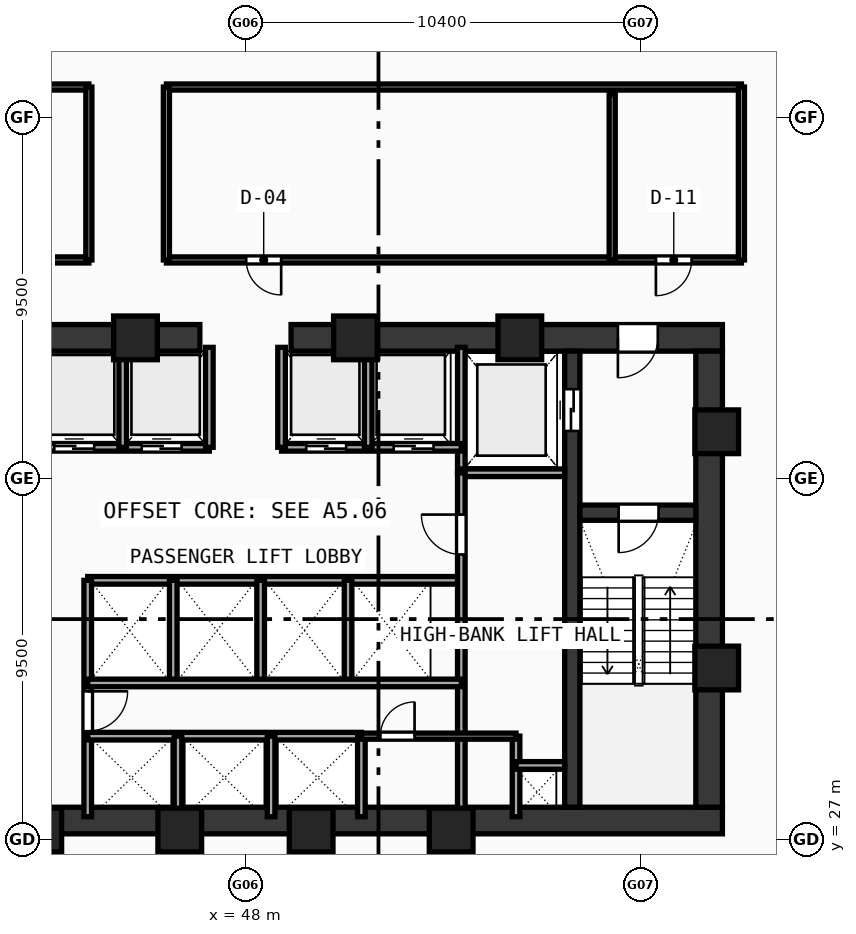
"""IFC4 building model, lengths in metres.
Left out: names, types, materials, properties, quantities, classifications, styles, units other than length and angle.
Written with IfcOpenShell. Run it as: python <this file> out.ifc"""

import sys

from ifc_helpers import new_model, si_unit, direction, frame, frame_2d, origin, origin_with_axes, origin_2d, place, context, subcontext, project, spatial, rectangle, hollow_rectangle, extrude, source, transform, mapped, element, fill, save


model = new_model("IFC4")
c1 = context("Model", 3, precision=1e-05, world=origin(), true_north=direction((0.0, 1.0)))
c2 = subcontext(c1, "Body", "Model", "MODEL_VIEW")
j1 = project(units=[si_unit("LENGTHUNIT", "METRE"), si_unit("PLANEANGLEUNIT", "RADIAN")], contexts=[c1])
p1 = place(None, origin())
s1 = spatial("IfcSite", under=j1, at=p1, CompositionType="ELEMENT")
p2 = place(p1, origin())
s2 = spatial("IfcBuilding", under=s1, at=p2, CompositionType="ELEMENT")
p3 = place(p2, frame((0.0, 0.0, 52.18)))
s3 = spatial("IfcBuildingStorey", under=s2, at=p3, CompositionType="ELEMENT", Elevation=52.18)
p4 = place(p3, frame((35.45, 27.5, 0.0), z_axis=(0.0, 0.0, 1.0), x_axis=(1.0, 0.0, 0.0)))
e1 = element("IfcWall", 1, at=p4, inside=s3, PredefinedType="SHEAR", context=c2, shape_type="SweptSolid", body=[
    extrude(rectangle(XDim=25.1, YDim=0.7, at=frame_2d((12.55, 0.0))), origin(), (0.0, 0.0, 1.0), 3.37),
])
p5 = place(p3, frame((35.45, 40.2, 0.0), z_axis=(0.0, 0.0, 1.0), x_axis=(1.0, 0.0, 0.0)))
e2 = element("IfcWall", 2, at=p5, inside=s3, PredefinedType="SHEAR", context=c2, shape_type="SweptSolid", body=[
    extrude(rectangle(XDim=11.35, YDim=0.7, at=frame_2d((5.675, 0.0))), origin(), (0.0, 0.0, 1.0), 3.37),
])
p6 = place(p5, frame((1.7, 0.0, 0.0)))
e3 = element("IfcOpeningElement", 3, at=p6, cuts=e2, PredefinedType="OPENING", context=c2, shape_type="SweptSolid", body=[
    extrude(rectangle(XDim=1.05, YDim=2.1, at=frame_2d((0.525, 1.05))), frame((0.0, 0.36, 0.0), z_axis=(0.0, -1.0, 0.0), x_axis=(1.0, 0.0, 0.0)), (0.0, 0.0, 1.0), 0.72),
])
p7 = place(p3, frame((49.2, 40.2, 0.0), z_axis=(0.0, 0.0, 1.0), x_axis=(1.0, 0.0, 0.0)))
e4 = element("IfcWall", 4, at=p7, inside=s3, PredefinedType="SHEAR", context=c2, shape_type="SweptSolid", body=[
    extrude(rectangle(XDim=11.35, YDim=0.7, at=frame_2d((5.675, 0.0))), origin(), (0.0, 0.0, 1.0), 3.37),
])
p8 = place(p7, frame((8.6, 0.0, 0.0)))
e5 = element("IfcOpeningElement", 5, at=p8, cuts=e4, PredefinedType="OPENING", context=c2, shape_type="SweptSolid", body=[
    extrude(rectangle(XDim=1.05, YDim=2.1, at=frame_2d((0.525, 1.05))), frame((0.0, 0.36, 0.0), z_axis=(0.0, -1.0, 0.0), x_axis=(1.0, 0.0, 0.0)), (0.0, 0.0, 1.0), 0.72),
])
p9 = place(p3, frame((60.2, 27.85, 0.0), z_axis=(0.0, 0.0, 1.0), x_axis=(0.0, 1.0, 0.0)))
e6 = element("IfcWall", 6, at=p9, inside=s3, PredefinedType="SHEAR", context=c2, shape_type="SweptSolid", body=[
    extrude(rectangle(XDim=12.0, YDim=0.7, at=frame_2d((6.0, 0.0))), origin(), (0.0, 0.0, 1.0), 3.37),
])
p10 = place(p3, frame((56.6, 27.85, 0.0), z_axis=(0.0, 0.0, 1.0), x_axis=(0.0, 1.0, 0.0)))
e7 = element("IfcWall", 7, at=p10, inside=s3, PredefinedType="SHEAR", context=c2, shape_type="SweptSolid", body=[
    extrude(rectangle(XDim=12.0, YDim=0.4, at=frame_2d((6.0, 0.0))), origin(), (0.0, 0.0, 1.0), 3.37),
])
p11 = place(p10, frame((9.9, 0.0, 0.0)))
e8 = element("IfcOpeningElement", 8, at=p11, cuts=e7, PredefinedType="OPENING", context=c2, shape_type="SweptSolid", body=[
    extrude(rectangle(XDim=1.1, YDim=2.1, at=frame_2d((0.55, 1.05))), frame((0.0, 0.21, 0.0), z_axis=(0.0, -1.0, 0.0), x_axis=(1.0, 0.0, 0.0)), (0.0, 0.0, 1.0), 0.42),
])
p12 = place(p3, frame((56.8, 35.6, 0.0), z_axis=(0.0, 0.0, 1.0), x_axis=(1.0, 0.0, 0.0)))
e9 = element("IfcWall", 9, at=p12, inside=s3, PredefinedType="SHEAR", context=c2, shape_type="SweptSolid", body=[
    extrude(rectangle(XDim=3.05, YDim=0.4, at=frame_2d((1.525, 0.0))), origin(), (0.0, 0.0, 1.0), 3.37),
])
p13 = place(p12, frame((1.02, 0.0, 0.0)))
e10 = element("IfcOpeningElement", 10, at=p13, cuts=e9, PredefinedType="OPENING", context=c2, shape_type="SweptSolid", body=[
    extrude(rectangle(XDim=1.05, YDim=2.1, at=frame_2d((0.525, 1.05))), frame((0.0, 0.21, 0.0), z_axis=(0.0, -1.0, 0.0), x_axis=(1.0, 0.0, 0.0)), (0.0, 0.0, 1.0), 0.42),
])
m1 = source(origin(), c2, "Body", "SweptSolid", [
    extrude(hollow_rectangle(XDim=1.15, YDim=1.15, WallThickness=0.048, at=origin_2d()), origin(), (0.0, 0.0, 1.0), 3.63),
])
for number, where, z_axis, x_axis in (
    (11, (42.588, 27.25, -0.26), (0.0, 0.0, 1.0), (1.0, 0.0, 0.0)),
    (12, (46.272, 27.25, -0.26), (0.0, 0.0, 1.0), (1.0, 0.0, 0.0)),
    (13, (49.729, 27.25, -0.26), (0.0, 0.0, 1.0), (1.0, 0.0, 0.0)),
    (14, (53.412, 27.25, -0.26), (0.0, 0.0, 1.0), (1.0, 0.0, 0.0)),
    (15, (60.4, 31.513, -0.26), (0.0, 0.0, 1.0), (1.0, 0.0, 0.0)),
    (16, (60.4, 37.729, -0.26), (0.0, 0.0, 1.0), (1.0, 0.0, 0.0)),
    (17, (55.219, 40.2, -0.26), (0.0, 0.0, 1.0), (1.0, 0.0, 0.0)),
    (18, (50.894, 40.2, -0.26), (0.0, 0.0, 1.0), (1.0, 0.0, 0.0)),
    (19, (45.106, 40.2, -0.26), (0.0, 0.0, 1.0), (1.0, 0.0, 0.0)),
):
    element("IfcColumn", number, at=place(p3, frame(where, z_axis=z_axis, x_axis=x_axis)), inside=s3, PredefinedType="COLUMN", context=c2, shape_type="MappedRepresentation", body=[
        mapped(m1, transform((0.0, 0.0, 0.0), scale=1.0)),
    ])
p14 = place(p3, frame((53.68, 36.65, 0.0), z_axis=(0.0, 0.0, 1.0), x_axis=(0.0, 1.0, 0.0)))
e20 = element("IfcWall", 20, at=p14, inside=s3, PredefinedType="SOLIDWALL", context=c2, shape_type="SweptSolid", body=[
    extrude(rectangle(XDim=3.3, YDim=0.2, at=frame_2d((1.65, 0.0))), origin(), (0.0, 0.0, 1.0), 3.37),
])
p15 = place(p3, frame((53.68, 36.65, 0.0), z_axis=(0.0, 0.0, 1.0), x_axis=(1.0, 0.0, 0.0)))
e21 = element("IfcWall", 21, at=p15, inside=s3, PredefinedType="SOLIDWALL", context=c2, shape_type="SweptSolid", body=[
    extrude(rectangle(XDim=2.72, YDim=0.2, at=frame_2d((1.36, 0.0))), origin(), (0.0, 0.0, 1.0), 3.37),
])
p16 = place(p3, frame((42.32, 37.32, 0.0), z_axis=(0.0, 0.0, 1.0), x_axis=(1.0, 0.0, 0.0)))
e22 = element("IfcWall", 22, at=p16, inside=s3, PredefinedType="SOLIDWALL", context=c2, shape_type="SweptSolid", body=[
    extrude(rectangle(XDim=4.73, YDim=0.2, at=frame_2d((2.365, 0.0))), origin(), (0.0, 0.0, 1.0), 3.37),
])
p17 = place(p16, frame((0.65, 0.0, 0.0)))
e23 = element("IfcOpeningElement", 23, at=p17, cuts=e22, PredefinedType="OPENING", context=c2, shape_type="SweptSolid", body=[
    extrude(rectangle(XDim=1.05, YDim=2.1, at=frame_2d((0.525, 1.05))), frame((0.0, 0.11, 0.0), z_axis=(0.0, -1.0, 0.0), x_axis=(1.0, 0.0, 0.0)), (0.0, 0.0, 1.0), 0.22),
])
p18 = place(p16, frame((2.95, 0.0, 0.0)))
e24 = element("IfcOpeningElement", 24, at=p18, cuts=e22, PredefinedType="OPENING", context=c2, shape_type="SweptSolid", body=[
    extrude(rectangle(XDim=1.05, YDim=2.1, at=frame_2d((0.525, 1.05))), frame((0.0, 0.11, 0.0), z_axis=(0.0, -1.0, 0.0), x_axis=(1.0, 0.0, 0.0)), (0.0, 0.0, 1.0), 0.22),
])
p19 = place(p3, frame((48.95, 37.32, 0.0), z_axis=(0.0, 0.0, 1.0), x_axis=(1.0, 0.0, 0.0)))
e25 = element("IfcWall", 25, at=p19, inside=s3, PredefinedType="SOLIDWALL", context=c2, shape_type="SweptSolid", body=[
    extrude(rectangle(XDim=4.73, YDim=0.2, at=frame_2d((2.365, 0.0))), origin(), (0.0, 0.0, 1.0), 3.37),
])
p20 = place(p19, frame((0.65, 0.0, 0.0)))
e26 = element("IfcOpeningElement", 26, at=p20, cuts=e25, PredefinedType="OPENING", context=c2, shape_type="SweptSolid", body=[
    extrude(rectangle(XDim=1.05, YDim=2.1, at=frame_2d((0.525, 1.05))), frame((0.0, 0.11, 0.0), z_axis=(0.0, -1.0, 0.0), x_axis=(1.0, 0.0, 0.0)), (0.0, 0.0, 1.0), 0.22),
])
p21 = place(p19, frame((2.95, 0.0, 0.0)))
e27 = element("IfcOpeningElement", 27, at=p21, cuts=e25, PredefinedType="OPENING", context=c2, shape_type="SweptSolid", body=[
    extrude(rectangle(XDim=1.05, YDim=2.1, at=frame_2d((0.525, 1.05))), frame((0.0, 0.11, 0.0), z_axis=(0.0, -1.0, 0.0), x_axis=(1.0, 0.0, 0.0)), (0.0, 0.0, 1.0), 0.22),
])
for number, where, z_axis, x_axis in (
    (28, (47.05, 37.32, 0.0), (0.0, 0.0, 1.0), (0.0, 1.0, 0.0)),
    (29, (48.95, 37.32, 0.0), (0.0, 0.0, 1.0), (0.0, 1.0, 0.0)),
    (30, (44.77, 37.32, 0.0), (0.0, 0.0, 1.0), (0.0, 1.0, 0.0)),
    (31, (51.23, 37.32, 0.0), (0.0, 0.0, 1.0), (0.0, 1.0, 0.0)),
):
    element("IfcWall", number, at=place(p3, frame(where, z_axis=z_axis, x_axis=x_axis)), inside=s3, PredefinedType="SOLIDWALL", context=c2, shape_type="SweptSolid", body=[
        extrude(rectangle(XDim=2.63, YDim=0.2, at=frame_2d((1.315, 0.0))), origin(), (0.0, 0.0, 1.0), 3.37),
    ])
p22 = place(p3, frame((43.85, 33.82, 0.0), z_axis=(0.0, 0.0, 1.0), x_axis=(1.0, 0.0, 0.0)))
e32 = element("IfcWall", 32, at=p22, inside=s3, PredefinedType="SOLIDWALL", context=c2, shape_type="SweptSolid", body=[
    extrude(rectangle(XDim=9.83, YDim=0.2, at=frame_2d((4.915, 0.0))), origin(), (0.0, 0.0, 1.0), 3.37),
])
p23 = place(p3, frame((43.85, 27.6, 0.0), z_axis=(0.0, 0.0, 1.0), x_axis=(0.0, 1.0, 0.0)))
e33 = element("IfcWall", 33, at=p23, inside=s3, PredefinedType="SOLIDWALL", context=c2, shape_type="SweptSolid", body=[
    extrude(rectangle(XDim=6.22, YDim=0.2, at=frame_2d((3.11, 0.0))), origin(), (0.0, 0.0, 1.0), 3.37),
])
p24 = place(p23, frame((2.25, 0.0, 0.0)))
e34 = element("IfcOpeningElement", 34, at=p24, cuts=e33, PredefinedType="OPENING", context=c2, shape_type="SweptSolid", body=[
    extrude(rectangle(XDim=1.05, YDim=2.1, at=frame_2d((0.525, 1.05))), frame((0.0, 0.11, 0.0), z_axis=(0.0, -1.0, 0.0), x_axis=(1.0, 0.0, 0.0)), (0.0, 0.0, 1.0), 0.22),
])
p25 = place(p3, frame((53.68, 27.6, 0.0), z_axis=(0.0, 0.0, 1.0), x_axis=(0.0, 1.0, 0.0)))
e35 = element("IfcWall", 35, at=p25, inside=s3, PredefinedType="SOLIDWALL", context=c2, shape_type="SweptSolid", body=[
    extrude(rectangle(XDim=9.05, YDim=0.2, at=frame_2d((4.525, 0.0))), origin(), (0.0, 0.0, 1.0), 3.37),
])
p26 = place(p25, frame((6.9, 0.0, 0.0)))
e36 = element("IfcOpeningElement", 36, at=p26, cuts=e35, PredefinedType="OPENING", context=c2, shape_type="SweptSolid", body=[
    extrude(rectangle(XDim=1.05, YDim=2.1, at=frame_2d((0.525, 1.05))), frame((0.0, 0.11, 0.0), z_axis=(0.0, -1.0, 0.0), x_axis=(1.0, 0.0, 0.0)), (0.0, 0.0, 1.0), 0.22),
])
for number, where, z_axis, x_axis in (
    (37, (46.1, 31.12, 0.0), (0.0, 0.0, 1.0), (0.0, 1.0, 0.0)),
    (38, (48.4, 31.12, 0.0), (0.0, 0.0, 1.0), (0.0, 1.0, 0.0)),
    (39, (50.7, 31.12, 0.0), (0.0, 0.0, 1.0), (0.0, 1.0, 0.0)),
):
    element("IfcWall", number, at=place(p3, frame(where, z_axis=z_axis, x_axis=x_axis)), inside=s3, PredefinedType="SOLIDWALL", context=c2, shape_type="SweptSolid", body=[
        extrude(rectangle(XDim=2.7, YDim=0.2, at=frame_2d((1.35, 0.0))), origin(), (0.0, 0.0, 1.0), 3.37),
    ])
p27 = place(p3, frame((43.85, 29.72, 0.0), z_axis=(0.0, 0.0, 1.0), x_axis=(1.0, 0.0, 0.0)))
e40 = element("IfcWall", 40, at=p27, inside=s3, PredefinedType="SOLIDWALL", context=c2, shape_type="SweptSolid", body=[
    extrude(rectangle(XDim=7.2, YDim=0.2, at=frame_2d((3.6, 0.0))), origin(), (0.0, 0.0, 1.0), 3.37),
])
p28 = place(p3, frame((51.05, 27.6, 0.0), z_axis=(0.0, 0.0, 1.0), x_axis=(0.0, 1.0, 0.0)))
e41 = element("IfcWall", 41, at=p28, inside=s3, PredefinedType="SOLIDWALL", context=c2, shape_type="SweptSolid", body=[
    extrude(rectangle(XDim=2.12, YDim=0.2, at=frame_2d((1.06, 0.0))), origin(), (0.0, 0.0, 1.0), 3.37),
])
p29 = place(p3, frame((43.85, 31.12, 0.0), z_axis=(0.0, 0.0, 1.0), x_axis=(1.0, 0.0, 0.0)))
e42 = element("IfcWall", 42, at=p29, inside=s3, PredefinedType="SOLIDWALL", context=c2, shape_type="SweptSolid", body=[
    extrude(rectangle(XDim=9.83, YDim=0.2, at=frame_2d((4.915, 0.0))), origin(), (0.0, 0.0, 1.0), 3.37),
])
for number, where, z_axis, x_axis in (
    (43, (46.225, 27.6, 0.0), (0.0, 0.0, 1.0), (0.0, 1.0, 0.0)),
    (44, (48.675, 27.6, 0.0), (0.0, 0.0, 1.0), (0.0, 1.0, 0.0)),
    (45, (55.12, 27.6, 0.0), (0.0, 0.0, 1.0), (0.0, 1.0, 0.0)),
):
    element("IfcWall", number, at=place(p3, frame(where, z_axis=z_axis, x_axis=x_axis)), inside=s3, PredefinedType="SOLIDWALL", context=c2, shape_type="SweptSolid", body=[
        extrude(rectangle(XDim=2.12, YDim=0.2, at=frame_2d((1.06, 0.0))), origin(), (0.0, 0.0, 1.0), 3.37),
    ])
p30 = place(p3, frame((55.12, 28.95, 0.0), z_axis=(0.0, 0.0, 1.0), x_axis=(1.0, 0.0, 0.0)))
e46 = element("IfcWall", 46, at=p30, inside=s3, PredefinedType="SOLIDWALL", context=c2, shape_type="SweptSolid", body=[
    extrude(rectangle(XDim=1.28, YDim=0.2, at=frame_2d((0.64, 0.0))), origin(), (0.0, 0.0, 1.0), 3.37),
])
p31 = place(p3, frame((51.05, 29.72, 0.0), z_axis=(0.0, 0.0, 1.0), x_axis=(1.0, 0.0, 0.0)))
e47 = element("IfcWall", 47, at=p31, inside=s3, PredefinedType="PARTITIONING", context=c2, shape_type="SweptSolid", body=[
    extrude(rectangle(XDim=4.07, YDim=0.16, at=frame_2d((2.035, 0.0))), origin(), (0.0, 0.0, 1.0), 3.37),
])
p32 = place(p31, frame((0.5, 0.0, 0.0)))
e48 = element("IfcOpeningElement", 48, at=p32, cuts=e47, PredefinedType="OPENING", context=c2, shape_type="SweptSolid", body=[
    extrude(rectangle(XDim=0.9, YDim=2.1, at=frame_2d((0.45, 1.05))), frame((0.0, 0.09, 0.0), z_axis=(0.0, -1.0, 0.0), x_axis=(1.0, 0.0, 0.0)), (0.0, 0.0, 1.0), 0.18),
])
p33 = place(p3, frame((33.65, 42.25, 0.0), z_axis=(0.0, 0.0, 1.0), x_axis=(1.0, 0.0, 0.0)))
e49 = element("IfcWall", 49, at=p33, inside=s3, PredefinedType="PARTITIONING", context=c2, shape_type="SweptSolid", body=[
    extrude(rectangle(XDim=10.23, YDim=0.16, at=frame_2d((5.115, 0.0))), origin(), (0.0, 0.0, 1.0), 2.67),
])
p34 = place(p33, frame((1.15, 0.0, 0.0)))
e50 = element("IfcOpeningElement", 50, at=p34, cuts=e49, PredefinedType="OPENING", context=c2, shape_type="SweptSolid", body=[
    extrude(rectangle(XDim=0.92, YDim=2.1, at=frame_2d((0.46, 1.05))), frame((0.0, 0.09, 0.0), z_axis=(0.0, -1.0, 0.0), x_axis=(1.0, 0.0, 0.0)), (0.0, 0.0, 1.0), 0.18),
])
p35 = place(p33, frame((4.65, 0.0, 0.0)))
e51 = element("IfcOpeningElement", 51, at=p35, cuts=e49, PredefinedType="OPENING", context=c2, shape_type="SweptSolid", body=[
    extrude(rectangle(XDim=0.92, YDim=2.1, at=frame_2d((0.46, 1.05))), frame((0.0, 0.09, 0.0), z_axis=(0.0, -1.0, 0.0), x_axis=(1.0, 0.0, 0.0)), (0.0, 0.0, 1.0), 0.18),
])
p36 = place(p3, frame((33.65, 46.8, 0.0), z_axis=(0.0, 0.0, 1.0), x_axis=(1.0, 0.0, 0.0)))
e52 = element("IfcWall", 52, at=p36, inside=s3, PredefinedType="PARTITIONING", context=c2, shape_type="SweptSolid", body=[
    extrude(rectangle(XDim=10.23, YDim=0.16, at=frame_2d((5.115, 0.0))), origin(), (0.0, 0.0, 1.0), 2.67),
])
p37 = place(p3, frame((43.88, 42.25, 0.0), z_axis=(0.0, 0.0, 1.0), x_axis=(0.0, 1.0, 0.0)))
e53 = element("IfcWall", 53, at=p37, inside=s3, PredefinedType="PARTITIONING", context=c2, shape_type="SweptSolid", body=[
    extrude(rectangle(XDim=4.55, YDim=0.16, at=frame_2d((2.275, 0.0))), origin(), (0.0, 0.0, 1.0), 2.67),
])
p38 = place(p3, frame((45.92, 42.25, 0.0), z_axis=(0.0, 0.0, 1.0), x_axis=(1.0, 0.0, 0.0)))
e54 = element("IfcWall", 54, at=p38, inside=s3, PredefinedType="PARTITIONING", context=c2, shape_type="SweptSolid", body=[
    extrude(rectangle(XDim=15.13, YDim=0.16, at=frame_2d((7.565, 0.0))), origin(), (0.0, 0.0, 1.0), 2.67),
])
p39 = place(p38, frame((2.1, 0.0, 0.0)))
e55 = element("IfcOpeningElement", 55, at=p39, cuts=e54, PredefinedType="OPENING", context=c2, shape_type="SweptSolid", body=[
    extrude(rectangle(XDim=0.92, YDim=2.1, at=frame_2d((0.46, 1.05))), frame((0.0, 0.09, 0.0), z_axis=(0.0, -1.0, 0.0), x_axis=(1.0, 0.0, 0.0)), (0.0, 0.0, 1.0), 0.18),
])
p40 = place(p38, frame((12.88, 0.0, 0.0)))
e56 = element("IfcOpeningElement", 56, at=p40, cuts=e54, PredefinedType="OPENING", context=c2, shape_type="SweptSolid", body=[
    extrude(rectangle(XDim=0.94, YDim=2.1, at=frame_2d((0.47, 1.05))), frame((0.0, 0.09, 0.0), z_axis=(0.0, -1.0, 0.0), x_axis=(1.0, 0.0, 0.0)), (0.0, 0.0, 1.0), 0.18),
])
p41 = place(p3, frame((45.92, 46.8, 0.0), z_axis=(0.0, 0.0, 1.0), x_axis=(1.0, 0.0, 0.0)))
e57 = element("IfcWall", 57, at=p41, inside=s3, PredefinedType="PARTITIONING", context=c2, shape_type="SweptSolid", body=[
    extrude(rectangle(XDim=15.13, YDim=0.16, at=frame_2d((7.565, 0.0))), origin(), (0.0, 0.0, 1.0), 2.67),
])
p42 = place(p3, frame((45.92, 42.25, 0.0), z_axis=(0.0, 0.0, 1.0), x_axis=(0.0, 1.0, 0.0)))
e58 = element("IfcWall", 58, at=p42, inside=s3, PredefinedType="PARTITIONING", context=c2, shape_type="SweptSolid", body=[
    extrude(rectangle(XDim=4.55, YDim=0.16, at=frame_2d((2.275, 0.0))), origin(), (0.0, 0.0, 1.0), 3.37),
])
p43 = place(p3, frame((61.05, 42.25, 0.0), z_axis=(0.0, 0.0, 1.0), x_axis=(0.0, 1.0, 0.0)))
e59 = element("IfcWall", 59, at=p43, inside=s3, PredefinedType="PARTITIONING", context=c2, shape_type="SweptSolid", body=[
    extrude(rectangle(XDim=4.55, YDim=0.16, at=frame_2d((2.275, 0.0))), origin(), (0.0, 0.0, 1.0), 2.67),
])
p44 = place(p3, frame((57.65, 42.25, 0.0), z_axis=(0.0, 0.0, 1.0), x_axis=(0.0, 1.0, 0.0)))
e60 = element("IfcWall", 60, at=p44, inside=s3, PredefinedType="PARTITIONING", context=c2, shape_type="SweptSolid", body=[
    extrude(rectangle(XDim=4.35, YDim=0.16, at=frame_2d((2.175, 0.0))), origin(), (0.0, 0.0, 1.0), 2.67),
])
m2 = source(origin(), c2, "Body", "SweptSolid", [
    extrude(rectangle(XDim=1.05, YDim=2.1, at=frame_2d((0.525, 1.05))), frame((0.0, 0.025, 0.0), z_axis=(0.0, -1.0, 0.0), x_axis=(1.0, 0.0, 0.0)), (0.0, 0.0, 1.0), 0.05),
])
p45 = place(p13, frame((1.05, 0.0, 0.0), z_axis=(0.0, 0.0, 1.0), x_axis=(-1.0, 0.0, 0.0)))
e61 = element("IfcDoor", 61, at=p45, inside=s3, OperationType="SINGLE_SWING_RIGHT", PredefinedType="DOOR", context=c2, shape_type="MappedRepresentation", body=[
    mapped(m2, transform((0.0, 0.0, 0.0), scale=1.0)),
])
fill(e10, e61)
p46 = place(p8, frame((1.05, 0.0, 0.0), z_axis=(0.0, 0.0, 1.0), x_axis=(-1.0, 0.0, 0.0)))
e62 = element("IfcDoor", 62, at=p46, inside=s3, OperationType="SINGLE_SWING_RIGHT", PredefinedType="DOOR", context=c2, shape_type="MappedRepresentation", body=[
    mapped(m2, transform((0.0, 0.0, 0.0), scale=1.0)),
])
fill(e5, e62)
m3 = source(origin(), c2, "Body", "SweptSolid", [
    extrude(rectangle(XDim=1.1, YDim=2.1, at=frame_2d((0.55, 1.05))), frame((0.0, 0.025, 0.0), z_axis=(0.0, -1.0, 0.0), x_axis=(1.0, 0.0, 0.0)), (0.0, 0.0, 1.0), 0.05),
])
p47 = place(p11, origin_with_axes())
e63 = element("IfcDoor", 63, at=p47, inside=s3, OperationType="DOUBLE_DOOR_SLIDING", PredefinedType="DOOR", context=c2, shape_type="MappedRepresentation", body=[
    mapped(m3, transform((0.0, 0.0, 0.0), scale=1.0)),
])
fill(e8, e63)
p48 = place(p17, frame((1.05, 0.0, 0.0), z_axis=(0.0, 0.0, 1.0), x_axis=(-1.0, 0.0, 0.0)))
e64 = element("IfcDoor", 64, at=p48, inside=s3, OperationType="DOUBLE_DOOR_SLIDING", PredefinedType="DOOR", context=c2, shape_type="MappedRepresentation", body=[
    mapped(m2, transform((0.0, 0.0, 0.0), scale=1.0)),
])
fill(e23, e64)
p49 = place(p18, frame((1.05, 0.0, 0.0), z_axis=(0.0, 0.0, 1.0), x_axis=(-1.0, 0.0, 0.0)))
e65 = element("IfcDoor", 65, at=p49, inside=s3, OperationType="DOUBLE_DOOR_SLIDING", PredefinedType="DOOR", context=c2, shape_type="MappedRepresentation", body=[
    mapped(m2, transform((0.0, 0.0, 0.0), scale=1.0)),
])
fill(e24, e65)
p50 = place(p20, frame((1.05, 0.0, 0.0), z_axis=(0.0, 0.0, 1.0), x_axis=(-1.0, 0.0, 0.0)))
e66 = element("IfcDoor", 66, at=p50, inside=s3, OperationType="DOUBLE_DOOR_SLIDING", PredefinedType="DOOR", context=c2, shape_type="MappedRepresentation", body=[
    mapped(m2, transform((0.0, 0.0, 0.0), scale=1.0)),
])
fill(e26, e66)
p51 = place(p21, frame((1.05, 0.0, 0.0), z_axis=(0.0, 0.0, 1.0), x_axis=(-1.0, 0.0, 0.0)))
e67 = element("IfcDoor", 67, at=p51, inside=s3, OperationType="DOUBLE_DOOR_SLIDING", PredefinedType="DOOR", context=c2, shape_type="MappedRepresentation", body=[
    mapped(m2, transform((0.0, 0.0, 0.0), scale=1.0)),
])
fill(e27, e67)
p52 = place(p24, frame((1.05, 0.0, 0.0), z_axis=(0.0, 0.0, 1.0), x_axis=(-1.0, 0.0, 0.0)))
e68 = element("IfcDoor", 68, at=p52, inside=s3, OperationType="SINGLE_SWING_LEFT", PredefinedType="DOOR", context=c2, shape_type="MappedRepresentation", body=[
    mapped(m2, transform((0.0, 0.0, 0.0), scale=1.0)),
])
fill(e34, e68)
p53 = place(p26, origin_with_axes())
e69 = element("IfcDoor", 69, at=p53, inside=s3, OperationType="SINGLE_SWING_RIGHT", PredefinedType="DOOR", context=c2, shape_type="MappedRepresentation", body=[
    mapped(m2, transform((0.0, 0.0, 0.0), scale=1.0)),
])
fill(e36, e69)
m4 = source(origin(), c2, "Body", "SweptSolid", [
    extrude(rectangle(XDim=0.9, YDim=2.1, at=frame_2d((0.45, 1.05))), frame((0.0, 0.025, 0.0), z_axis=(0.0, -1.0, 0.0), x_axis=(1.0, 0.0, 0.0)), (0.0, 0.0, 1.0), 0.05),
])
p54 = place(p32, origin_with_axes())
e70 = element("IfcDoor", 70, at=p54, inside=s3, OperationType="SINGLE_SWING_RIGHT", PredefinedType="DOOR", context=c2, shape_type="MappedRepresentation", body=[
    mapped(m4, transform((0.0, 0.0, 0.0), scale=1.0)),
])
fill(e48, e70)
m5 = source(origin(), c2, "Body", "SweptSolid", [
    extrude(rectangle(XDim=0.92, YDim=2.1, at=frame_2d((0.46, 1.05))), frame((0.0, 0.025, 0.0), z_axis=(0.0, -1.0, 0.0), x_axis=(1.0, 0.0, 0.0)), (0.0, 0.0, 1.0), 0.05),
])
p55 = place(p39, frame((0.92, 0.0, 0.0), z_axis=(0.0, 0.0, 1.0), x_axis=(-1.0, 0.0, 0.0)))
e71 = element("IfcDoor", 71, at=p55, inside=s3, OperationType="SINGLE_SWING_LEFT", PredefinedType="DOOR", context=c2, shape_type="MappedRepresentation", body=[
    mapped(m5, transform((0.0, 0.0, 0.0), scale=1.0)),
])
fill(e55, e71)
m6 = source(origin(), c2, "Body", "SweptSolid", [
    extrude(rectangle(XDim=0.94, YDim=2.1, at=frame_2d((0.47, 1.05))), frame((0.0, 0.025, 0.0), z_axis=(0.0, -1.0, 0.0), x_axis=(1.0, 0.0, 0.0)), (0.0, 0.0, 1.0), 0.05),
])
p56 = place(p40, frame((0.94, 0.0, 0.0), z_axis=(0.0, 0.0, 1.0), x_axis=(-1.0, 0.0, 0.0)))
e72 = element("IfcDoor", 72, at=p56, inside=s3, OperationType="SINGLE_SWING_RIGHT", PredefinedType="DOOR", context=c2, shape_type="MappedRepresentation", body=[
    mapped(m6, transform((0.0, 0.0, 0.0), scale=1.0)),
])
fill(e56, e72)
save(model, sys.argv[1])
